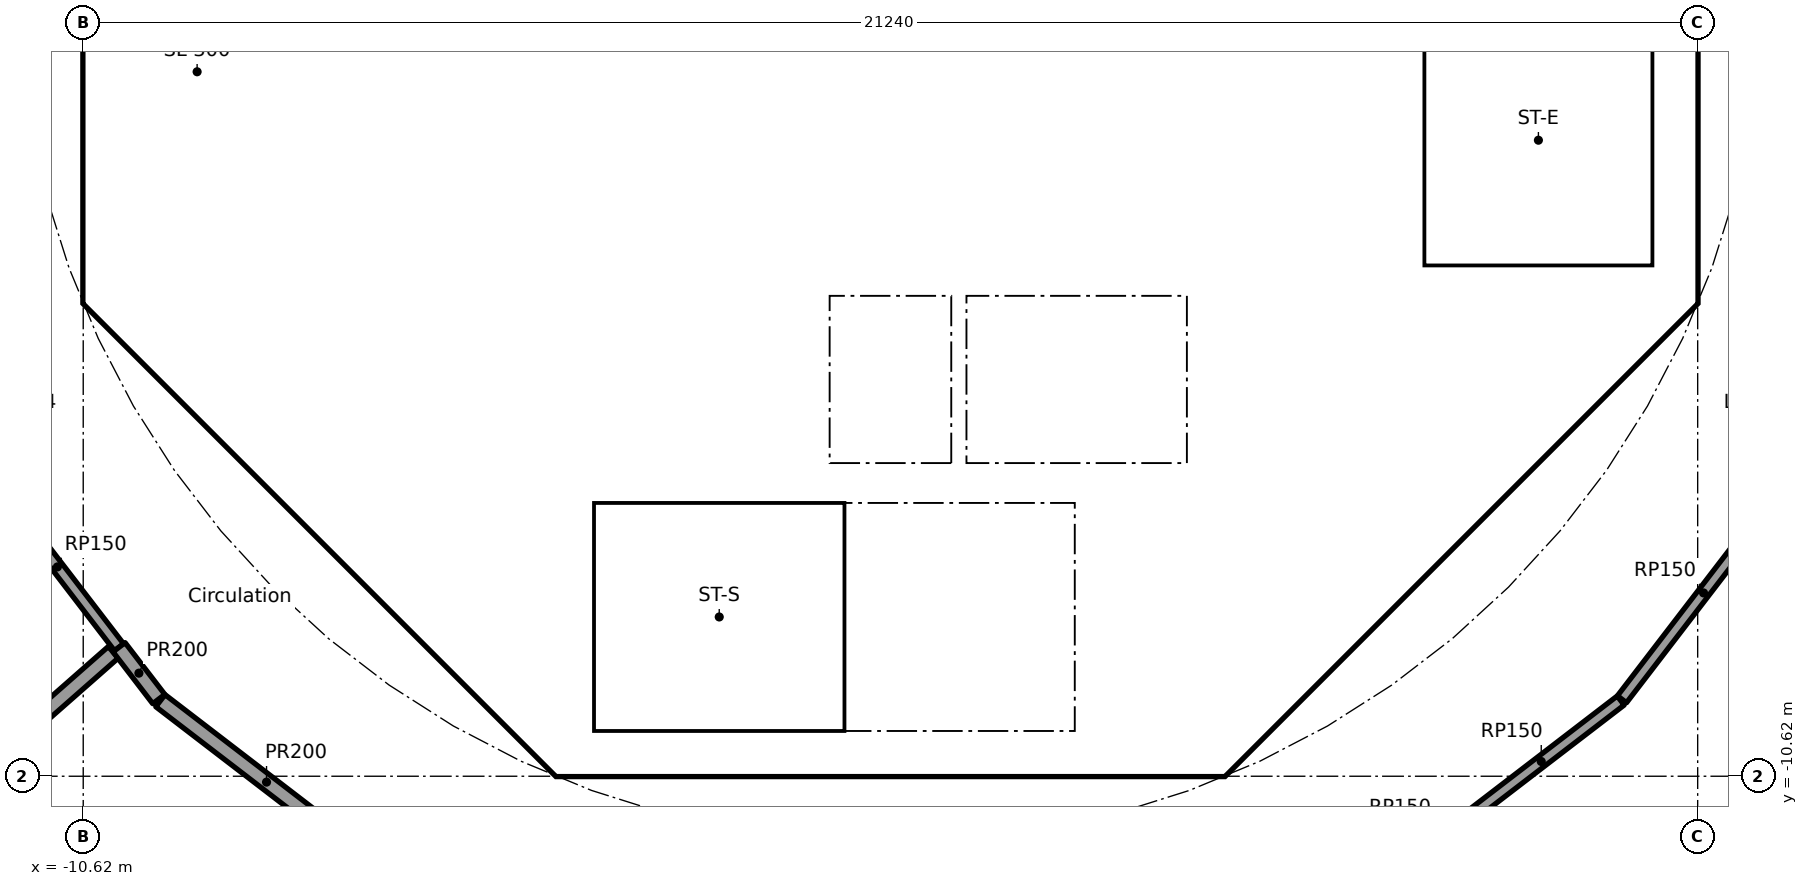
"""IFC4 building model, lengths in metres.
Left out: names, types, materials, properties, quantities, classifications, styles, units other than length and angle.
Written with IfcOpenShell. Run it as: python <this file> out.ifc"""

import sys

from ifc_helpers import new_model, si_unit, direction, frame, frame_2d, origin, place, context, subcontext, project, spatial, polyline, rectangle, outline, extrude, element, fill, save


model = new_model("IFC4")
c1 = context("Model", 3, precision=1e-05, world=origin(), true_north=direction((0.0, 1.0)))
c2 = subcontext(c1, "Body", "Model", "MODEL_VIEW")
j1 = project(units=[si_unit("LENGTHUNIT", "METRE"), si_unit("PLANEANGLEUNIT", "RADIAN")], contexts=[c1])
p1 = place(None, origin())
s1 = spatial("IfcSite", under=j1, at=p1, CompositionType="ELEMENT")
p2 = place(p1, origin())
s2 = spatial("IfcBuilding", under=s1, at=p2, CompositionType="ELEMENT")
p3 = place(p2, frame((0.0, 0.0, 332.9)))
s3 = spatial("IfcBuildingStorey", under=s2, at=p3, CompositionType="ELEMENT", Elevation=332.9)
p4 = place(p3, frame((-10.325, 3.801, 0.0), z_axis=(0.0, 0.0, 1.0), x_axis=(0.0, -1.0, 0.0)))
e1 = element("IfcWall", 1, at=p4, inside=s3, PredefinedType="SHEAR", context=c2, shape_type="SweptSolid", body=[
    extrude(rectangle(XDim=7.602, YDim=0.6, at=frame_2d((3.801, 0.0))), origin(), (0.0, 0.0, 1.0), 3.7),
])
p5 = place(p4, frame((0.651, 0.0, 0.0)))
e2 = element("IfcOpeningElement", 2, at=p5, cuts=e1, PredefinedType="OPENING", context=c2, shape_type="SweptSolid", body=[
    extrude(rectangle(XDim=1.5, YDim=2.1, at=frame_2d((0.75, 1.05))), frame((0.0, 0.31, 0.0), z_axis=(0.0, -1.0, 0.0), x_axis=(1.0, 0.0, 0.0)), (0.0, 0.0, 1.0), 0.62),
])
p6 = place(p4, frame((5.451, 0.0, 0.0)))
e3 = element("IfcOpeningElement", 3, at=p6, cuts=e1, PredefinedType="OPENING", context=c2, shape_type="SweptSolid", body=[
    extrude(rectangle(XDim=1.5, YDim=2.1, at=frame_2d((0.75, 1.05))), frame((0.0, 0.31, 0.0), z_axis=(0.0, -1.0, 0.0), x_axis=(1.0, 0.0, 0.0)), (0.0, 0.0, 1.0), 0.62),
])
p7 = place(p3, frame((-9.988, -4.613, 0.0), z_axis=(0.0, 0.0, 1.0), x_axis=(0.707106781187, -0.707106781187, 0.0)))
e4 = element("IfcWall", 4, at=p7, inside=s3, PredefinedType="SHEAR", context=c2, shape_type="SweptSolid", body=[
    extrude(rectangle(XDim=7.602, YDim=0.6, at=frame_2d((3.801, 0.0))), origin(), (0.0, 0.0, 1.0), 3.7),
])
p8 = place(p7, frame((6.151, 0.0, 0.0)))
e5 = element("IfcOpeningElement", 5, at=p8, cuts=e4, PredefinedType="OPENING", context=c2, shape_type="SweptSolid", body=[
    extrude(rectangle(XDim=1.1, YDim=2.1, at=frame_2d((0.55, 1.05))), frame((0.0, 0.31, 0.0), z_axis=(0.0, -1.0, 0.0), x_axis=(1.0, 0.0, 0.0)), (0.0, 0.0, 1.0), 0.62),
])
p9 = place(p3, frame((4.613, -9.988, 0.0), z_axis=(0.0, 0.0, 1.0), x_axis=(0.707106781187, 0.707106781187, 0.0)))
e6 = element("IfcWall", 6, at=p9, inside=s3, PredefinedType="SHEAR", context=c2, shape_type="SweptSolid", body=[
    extrude(rectangle(XDim=7.602, YDim=0.6, at=frame_2d((3.801, 0.0))), origin(), (0.0, 0.0, 1.0), 3.7),
])
p10 = place(p9, frame((3.201, 0.0, 0.0)))
e7 = element("IfcOpeningElement", 7, at=p10, cuts=e6, PredefinedType="OPENING", context=c2, shape_type="SweptSolid", body=[
    extrude(rectangle(XDim=1.2, YDim=2.1, at=frame_2d((0.6, 1.05))), frame((0.0, 0.31, 0.0), z_axis=(0.0, -1.0, 0.0), x_axis=(1.0, 0.0, 0.0)), (0.0, 0.0, 1.0), 0.62),
])
p11 = place(p3, frame((4.0, -10.025, 0.0), z_axis=(0.0, 0.0, 1.0), x_axis=(0.0, 1.0, 0.0)))
e8 = element("IfcWall", 8, at=p11, inside=s3, PredefinedType="SOLIDWALL", context=c2, shape_type="SweptSolid", body=[
    extrude(rectangle(XDim=3.0, YDim=0.2, at=frame_2d((1.5, 0.0))), origin(), (0.0, 0.0, 1.0), 3.7),
])
p12 = place(p11, frame((0.975, 0.0, 0.0)))
e9 = element("IfcOpeningElement", 9, at=p12, cuts=e8, PredefinedType="OPENING", context=c2, shape_type="SweptSolid", body=[
    extrude(rectangle(XDim=1.1, YDim=2.1, at=frame_2d((0.55, 1.05))), frame((0.0, 0.11, 0.0), z_axis=(0.0, -1.0, 0.0), x_axis=(1.0, 0.0, 0.0)), (0.0, 0.0, 1.0), 0.22),
])
p13 = place(p3, frame((-7.0, -7.027, 0.0), z_axis=(0.0, 0.0, 1.0), x_axis=(0.0, 1.0, 0.0)))
e10 = element("IfcWall", 10, at=p13, inside=s3, PredefinedType="PARTITIONING", context=c2, shape_type="SweptSolid", body=[
    extrude(rectangle(XDim=2.927, YDim=0.15, at=frame_2d((1.463, 0.0))), origin(), (0.0, 0.0, 1.0), 3.7),
])
p14 = place(p13, frame((0.976, 0.0, 0.0)))
e11 = element("IfcOpeningElement", 11, at=p14, cuts=e10, PredefinedType="OPENING", context=c2, shape_type="SweptSolid", body=[
    extrude(rectangle(XDim=0.9, YDim=2.1, at=frame_2d((0.45, 1.05))), frame((0.0, 0.085, 0.0), z_axis=(0.0, -1.0, 0.0), x_axis=(1.0, 0.0, 0.0)), (0.0, 0.0, 1.0), 0.17),
])
p15 = place(p3, frame((4.0, -6.5, 0.0), z_axis=(0.0, 0.0, 1.0), x_axis=(0.0, 1.0, 0.0)))
e12 = element("IfcWall", 12, at=p15, inside=s3, PredefinedType="SOLIDWALL", context=c2, shape_type="SweptSolid", body=[
    extrude(rectangle(XDim=2.2, YDim=0.2, at=frame_2d((1.1, 0.0))), origin(), (0.0, 0.0, 1.0), 3.7),
])
p16 = place(p15, frame((0.55, 0.0, 0.0)))
e13 = element("IfcOpeningElement", 13, at=p16, cuts=e12, PredefinedType="OPENING", context=c2, shape_type="SweptSolid", body=[
    extrude(rectangle(XDim=1.1, YDim=2.1, at=frame_2d((0.55, 1.05))), frame((0.0, 0.11, 0.0), z_axis=(0.0, -1.0, 0.0), x_axis=(1.0, 0.0, 0.0)), (0.0, 0.0, 1.0), 0.22),
])
p17 = place(p3, frame((-4.0, -6.5, 0.0), z_axis=(0.0, 0.0, 1.0), x_axis=(0.0, 1.0, 0.0)))
e14 = element("IfcWall", 14, at=p17, inside=s3, PredefinedType="SOLIDWALL", context=c2, shape_type="SweptSolid", body=[
    extrude(rectangle(XDim=2.2, YDim=0.2, at=frame_2d((1.1, 0.0))), origin(), (0.0, 0.0, 1.0), 3.7),
])
p18 = place(p17, frame((0.65, 0.0, 0.0)))
e15 = element("IfcOpeningElement", 15, at=p18, cuts=e14, PredefinedType="OPENING", context=c2, shape_type="SweptSolid", body=[
    extrude(rectangle(XDim=0.9, YDim=2.1, at=frame_2d((0.45, 1.05))), frame((0.0, 0.11, 0.0), z_axis=(0.0, -1.0, 0.0), x_axis=(1.0, 0.0, 0.0)), (0.0, 0.0, 1.0), 0.22),
])
p19 = place(p3, frame((-6.7, -2.0, 0.0), z_axis=(0.0, 0.0, 1.0), x_axis=(1.0, 0.0, 0.0)))
e16 = element("IfcWall", 16, at=p19, inside=s3, PredefinedType="SOLIDWALL", context=c2, shape_type="SweptSolid", body=[
    extrude(rectangle(XDim=13.4, YDim=0.2, at=frame_2d((6.7, 0.0))), origin(), (0.0, 0.0, 1.0), 3.7),
])
p20 = place(p19, frame((1.85, 0.0, 0.0)))
e17 = element("IfcOpeningElement", 17, at=p20, cuts=e16, PredefinedType="OPENING", context=c2, shape_type="SweptSolid", body=[
    extrude(rectangle(XDim=0.9, YDim=2.1, at=frame_2d((0.45, 1.05))), frame((0.0, 0.11, 0.0), z_axis=(0.0, -1.0, 0.0), x_axis=(1.0, 0.0, 0.0)), (0.0, 0.0, 1.0), 0.22),
])
p21 = place(p19, frame((6.25, 0.0, 0.0)))
e18 = element("IfcOpeningElement", 18, at=p21, cuts=e16, PredefinedType="OPENING", context=c2, shape_type="SweptSolid", body=[
    extrude(rectangle(XDim=0.9, YDim=2.1, at=frame_2d((0.45, 1.05))), frame((0.0, 0.11, 0.0), z_axis=(0.0, -1.0, 0.0), x_axis=(1.0, 0.0, 0.0)), (0.0, 0.0, 1.0), 0.22),
])
p22 = place(p19, frame((10.65, 0.0, 0.0)))
e19 = element("IfcOpeningElement", 19, at=p22, cuts=e16, PredefinedType="OPENING", context=c2, shape_type="SweptSolid", body=[
    extrude(rectangle(XDim=0.9, YDim=2.1, at=frame_2d((0.45, 1.05))), frame((0.0, 0.11, 0.0), z_axis=(0.0, -1.0, 0.0), x_axis=(1.0, 0.0, 0.0)), (0.0, 0.0, 1.0), 0.22),
])
p23 = place(p3, origin())
e20 = element("IfcWall", 20, at=p23, inside=s3, PredefinedType="SHEAR", context=c2, shape_type="SweptSolid", body=[
    extrude(outline(polyline([(-10.625, -3.801), (-10.025, -3.801), (-10.025, -4.152), (-9.776, -4.401), (-10.2, -4.825), (-10.625, -4.401), (-10.625, -3.801)])), origin(), (0.0, 0.0, 1.0), 3.7),
])
p24 = place(p3, origin())
e21 = element("IfcWall", 21, at=p24, inside=s3, PredefinedType="SHEAR", context=c2, shape_type="SweptSolid", body=[
    extrude(outline(polyline([(-4.152, -10.025), (4.152, -10.025), (4.401, -9.776), (4.825, -10.2), (4.401, -10.625), (-4.401, -10.625), (-4.825, -10.2), (-4.401, -9.776), (-4.152, -10.025)])), origin(), (0.0, 0.0, 1.0), 3.7),
])
p25 = place(p3, origin())
e22 = element("IfcWall", 22, at=p25, inside=s3, PredefinedType="SHEAR", context=c2, shape_type="SweptSolid", body=[
    extrude(outline(polyline([(9.776, -4.401), (10.025, -4.152), (10.025, -3.801), (10.025, 4.152), (9.776, 4.401), (10.2, 4.825), (10.625, 4.401), (10.625, -4.401), (10.2, -4.825), (9.776, -4.401)])), origin(), (0.0, 0.0, 1.0), 3.7),
])
for number, where, z_axis, x_axis in (
    (23, (-0.9, -6.5, 0.0), (0.0, 0.0, 1.0), (0.0, 1.0, 0.0)),
    (24, (0.9, -6.5, 0.0), (0.0, 0.0, 1.0), (0.0, 1.0, 0.0)),
):
    element("IfcWall", number, at=place(p3, frame(where, z_axis=z_axis, x_axis=x_axis)), inside=s3, PredefinedType="SOLIDWALL", context=c2, shape_type="SweptSolid", body=[
        extrude(rectangle(XDim=2.2, YDim=0.2, at=frame_2d((1.1, 0.0))), origin(), (0.0, 0.0, 1.0), 3.7),
    ])
p26 = place(p3, origin())
e25 = element("IfcWall", 25, at=p26, inside=s3, PredefinedType="SOLIDWALL", context=c2, shape_type="SweptSolid", body=[
    extrude(outline(polyline([(-6.7, -2.1), (-6.5, -2.1), (-6.5, -4.1), (-2.3, -4.1), (-2.3, -2.1), (-2.1, -2.1), (-2.1, -4.1), (2.1, -4.1), (2.1, -2.1), (2.3, -2.1), (2.3, -4.1), (6.5, -4.1), (6.5, -2.1), (6.7, -2.1), (6.7, -4.3), (-6.7, -4.3), (-6.7, -2.1)])), origin(), (0.0, 0.0, 1.0), 3.7),
])
p27 = place(p3, frame((-10.025, -4.0, 0.0), z_axis=(0.0, 0.0, 1.0), x_axis=(1.0, 0.0, 0.0)))
e26 = element("IfcWall", 26, at=p27, inside=s3, PredefinedType="PARTITIONING", context=c2, shape_type="SweptSolid", body=[
    extrude(rectangle(XDim=3.325, YDim=0.2, at=frame_2d((1.662, 0.0))), origin(), (0.0, 0.0, 1.0), 3.7),
])
p28 = place(p3, origin())
e27 = element("IfcWall", 27, at=p28, inside=s3, PredefinedType="SOLIDWALL", context=c2, shape_type="SweptSolid", body=[
    extrude(outline(polyline([(-3.9, -10.025), (-4.1, -10.025), (-4.1, -7.025), (-3.9, -7.025), (-3.9, -10.025)])), origin(), (0.0, 0.0, 1.0), 3.7),
])
p29 = place(p3, origin())
e28 = element("IfcWall", 28, at=p29, inside=s3, PredefinedType="SOLIDWALL", context=c2, shape_type="SweptSolid", body=[
    extrude(outline(polyline([(4.1, -7.025), (-4.1, -7.025), (-4.1, -6.5), (4.1, -6.5), (4.1, -7.025)])), origin(), (0.0, 0.0, 1.0), 3.7),
])
p30 = place(p3, origin())
e29 = element("IfcWall", 29, at=p30, inside=s3, PredefinedType="SOLIDWALL", context=c2, shape_type="SweptSolid", body=[
    extrude(outline(polyline([(7.025, -3.9), (6.7, -3.9), (6.7, 3.9), (7.025, 3.9), (7.025, -3.9)])), origin(), (0.0, 0.0, 1.0), 3.7),
])
p31 = place(p3, origin())
e30 = element("IfcWall", 30, at=p31, inside=s3, PredefinedType="SOLIDWALL", context=c2, shape_type="SweptSolid", body=[
    extrude(outline(polyline([(10.025, -4.1), (6.7, -4.1), (6.7, -3.9), (10.025, -3.9), (10.025, -4.1)])), origin(), (0.0, 0.0, 1.0), 3.7),
])
p32 = place(p3, frame((-10.149, -8.923, 0.0), z_axis=(0.0, 0.0, 1.0), x_axis=(-0.608731606531, 0.793376222993, 0.0)))
e31 = element("IfcWall", 31, at=p32, inside=s3, PredefinedType="PARTITIONING", context=c2, shape_type="SweptSolid", body=[
    extrude(rectangle(XDim=2.664, YDim=0.15, at=frame_2d((1.332, 0.0))), origin(), (0.0, 0.0, 1.0), 3.7),
])
p33 = place(p3, frame((9.607, -9.624, 0.0), z_axis=(0.0, 0.0, 1.0), x_axis=(-0.793381127635, -0.608725214126, 0.0)))
e32 = element("IfcWall", 32, at=p33, inside=s3, PredefinedType="PARTITIONING", context=c2, shape_type="SweptSolid", body=[
    extrude(rectangle(XDim=2.635, YDim=0.15, at=frame_2d((1.317, 0.0))), origin(), (0.0, 0.0, 1.0), 3.7),
])
p34 = place(p3, frame((11.771, -6.809, 0.0), z_axis=(0.0, 0.0, 1.0), x_axis=(-0.608736710054, -0.793372307201, 0.0)))
e33 = element("IfcWall", 33, at=p34, inside=s3, PredefinedType="PARTITIONING", context=c2, shape_type="SweptSolid", body=[
    extrude(rectangle(XDim=3.527, YDim=0.15, at=frame_2d((1.763, 0.0))), origin(), (0.0, 0.0, 1.0), 3.7),
])
p35 = place(p3, frame((-10.224, -8.989, 0.0), z_axis=(0.0, 0.0, 1.0), x_axis=(-0.750994766266, -0.660308156122, 0.0)))
e34 = element("IfcWall", 34, at=p35, inside=s3, PredefinedType="PARTITIONING", context=c2, shape_type="SweptSolid", body=[
    extrude(rectangle(XDim=4.097, YDim=0.2, at=frame_2d((2.049, 0.0))), origin(), (0.0, 0.0, 1.0), 3.7),
])
p36 = place(p3, frame((-9.626, -9.605, 0.0), z_axis=(0.0, 0.0, 1.0), x_axis=(-0.608694005511, 0.793405071609, 0.0)))
e35 = element("IfcWall", 35, at=p36, inside=s3, PredefinedType="PARTITIONING", context=c2, shape_type="SweptSolid", body=[
    extrude(rectangle(XDim=0.859, YDim=0.2, at=frame_2d((0.43, 0.0))), origin(), (0.0, 0.0, 1.0), 3.7),
])
p37 = place(p3, frame((-6.812, -11.769, 0.0), z_axis=(0.0, 0.0, 1.0), x_axis=(-0.793402024283, 0.608697977542, 0.0)))
e36 = element("IfcWall", 36, at=p37, inside=s3, PredefinedType="PARTITIONING", context=c2, shape_type="SweptSolid", body=[
    extrude(rectangle(XDim=3.52, YDim=0.2, at=frame_2d((1.76, 0.0))), origin(), (0.0, 0.0, 1.0), 3.7),
])
p38 = place(p16, origin())
e37 = element("IfcDoor", 37, at=p38, inside=s3, OperationType="DOUBLE_DOOR_SLIDING", PredefinedType="DOOR", context=c2, shape_type="SweptSolid", body=[
    extrude(rectangle(XDim=1.1, YDim=2.1, at=frame_2d((0.55, 1.05))), frame((0.0, 0.025, 0.0), z_axis=(0.0, -1.0, 0.0), x_axis=(1.0, 0.0, 0.0)), (0.0, 0.0, 1.0), 0.05),
])
fill(e13, e37)
p39 = place(p12, origin())
e38 = element("IfcDoor", 38, at=p39, inside=s3, OperationType="SINGLE_SWING_RIGHT", PredefinedType="DOOR", context=c2, shape_type="SweptSolid", body=[
    extrude(rectangle(XDim=1.1, YDim=2.1, at=frame_2d((0.55, 1.05))), frame((0.0, 0.025, 0.0), z_axis=(0.0, -1.0, 0.0), x_axis=(1.0, 0.0, 0.0)), (0.0, 0.0, 1.0), 0.05),
])
fill(e9, e38)
p40 = place(p14, origin())
e39 = element("IfcDoor", 39, at=p40, inside=s3, OperationType="SINGLE_SWING_RIGHT", PredefinedType="DOOR", context=c2, shape_type="SweptSolid", body=[
    extrude(rectangle(XDim=0.9, YDim=2.1, at=frame_2d((0.45, 1.05))), frame((0.0, 0.025, 0.0), z_axis=(0.0, -1.0, 0.0), x_axis=(1.0, 0.0, 0.0)), (0.0, 0.0, 1.0), 0.05),
])
fill(e11, e39)
p41 = place(p18, frame((0.9, 0.0, 0.0), x_axis=(-1.0, 0.0, 0.0)))
e40 = element("IfcDoor", 40, at=p41, inside=s3, OperationType="SINGLE_SWING_RIGHT", PredefinedType="DOOR", context=c2, shape_type="SweptSolid", body=[
    extrude(rectangle(XDim=0.9, YDim=2.1, at=frame_2d((0.45, 1.05))), frame((0.0, 0.025, 0.0), z_axis=(0.0, -1.0, 0.0), x_axis=(1.0, 0.0, 0.0)), (0.0, 0.0, 1.0), 0.05),
])
fill(e15, e40)
p42 = place(p20, frame((0.9, 0.0, 0.0), x_axis=(-1.0, 0.0, 0.0)))
e41 = element("IfcDoor", 41, at=p42, inside=s3, OperationType="SINGLE_SWING_RIGHT", PredefinedType="DOOR", context=c2, shape_type="SweptSolid", body=[
    extrude(rectangle(XDim=0.9, YDim=2.1, at=frame_2d((0.45, 1.05))), frame((0.0, 0.025, 0.0), z_axis=(0.0, -1.0, 0.0), x_axis=(1.0, 0.0, 0.0)), (0.0, 0.0, 1.0), 0.05),
])
fill(e17, e41)
p43 = place(p21, frame((0.9, 0.0, 0.0), x_axis=(-1.0, 0.0, 0.0)))
e42 = element("IfcDoor", 42, at=p43, inside=s3, OperationType="SINGLE_SWING_RIGHT", PredefinedType="DOOR", context=c2, shape_type="SweptSolid", body=[
    extrude(rectangle(XDim=0.9, YDim=2.1, at=frame_2d((0.45, 1.05))), frame((0.0, 0.025, 0.0), z_axis=(0.0, -1.0, 0.0), x_axis=(1.0, 0.0, 0.0)), (0.0, 0.0, 1.0), 0.05),
])
fill(e18, e42)
p44 = place(p22, frame((0.9, 0.0, 0.0), x_axis=(-1.0, 0.0, 0.0)))
e43 = element("IfcDoor", 43, at=p44, inside=s3, OperationType="SINGLE_SWING_LEFT", PredefinedType="DOOR", context=c2, shape_type="SweptSolid", body=[
    extrude(rectangle(XDim=0.9, YDim=2.1, at=frame_2d((0.45, 1.05))), frame((0.0, 0.025, 0.0), z_axis=(0.0, -1.0, 0.0), x_axis=(1.0, 0.0, 0.0)), (0.0, 0.0, 1.0), 0.05),
])
fill(e19, e43)
p45 = place(p10, origin())
e44 = element("IfcDoor", 44, at=p45, inside=s3, OperationType="SINGLE_SWING_RIGHT", PredefinedType="DOOR", context=c2, shape_type="SweptSolid", body=[
    extrude(rectangle(XDim=1.2, YDim=2.1, at=frame_2d((0.6, 1.05))), frame((0.0, 0.025, 0.0), z_axis=(0.0, -1.0, 0.0), x_axis=(1.0, 0.0, 0.0)), (0.0, 0.0, 1.0), 0.05),
])
fill(e7, e44)
p46 = place(p6, origin())
e45 = element("IfcDoor", 45, at=p46, inside=s3, OperationType="DOUBLE_DOOR_SINGLE_SWING", PredefinedType="DOOR", context=c2, shape_type="SweptSolid", body=[
    extrude(rectangle(XDim=1.5, YDim=2.1, at=frame_2d((0.75, 1.05))), frame((0.0, 0.025, 0.0), z_axis=(0.0, -1.0, 0.0), x_axis=(1.0, 0.0, 0.0)), (0.0, 0.0, 1.0), 0.05),
])
fill(e3, e45)
p47 = place(p8, origin())
e46 = element("IfcDoor", 46, at=p47, inside=s3, OperationType="SINGLE_SWING_RIGHT", PredefinedType="DOOR", context=c2, shape_type="SweptSolid", body=[
    extrude(rectangle(XDim=1.1, YDim=2.1, at=frame_2d((0.55, 1.05))), frame((0.0, 0.025, 0.0), z_axis=(0.0, -1.0, 0.0), x_axis=(1.0, 0.0, 0.0)), (0.0, 0.0, 1.0), 0.05),
])
fill(e5, e46)
save(model, sys.argv[1])
